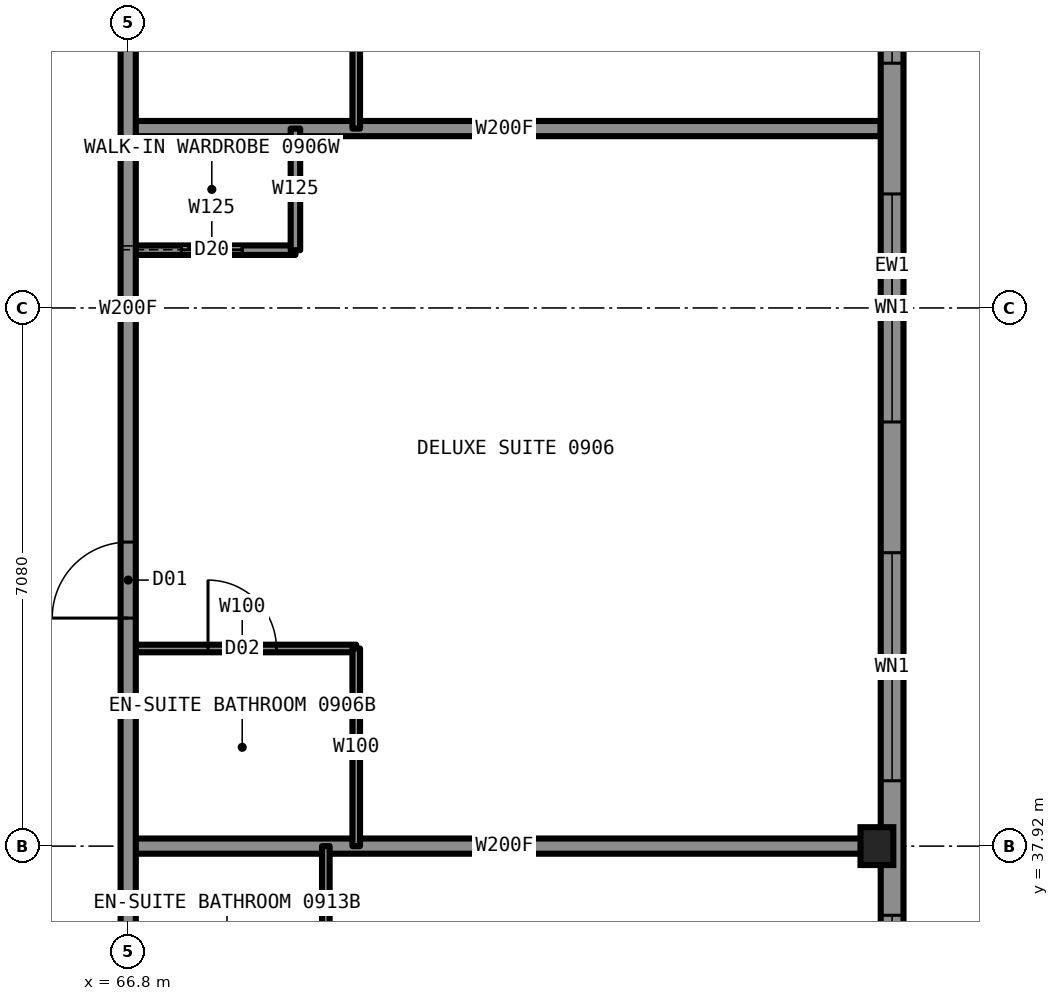
"""IFC4 building model, lengths in metres.
Left out: names, types, materials, properties, quantities, classifications, styles, units other than length and angle.
Written with IfcOpenShell. Run it as: python <this file> out.ifc"""

import sys

from ifc_helpers import new_model, si_unit, direction, frame, frame_2d, origin, origin_2d, place, context, subcontext, project, spatial, rectangle, i_section, extrude, element, fill, save


model = new_model("IFC4")
c1 = context("Model", 3, precision=1e-05, world=origin(), true_north=direction((0.0, 1.0)))
c2 = subcontext(c1, "Body", "Model", "MODEL_VIEW")
j1 = project(units=[si_unit("LENGTHUNIT", "METRE"), si_unit("PLANEANGLEUNIT", "RADIAN")], contexts=[c1])
p1 = place(None, origin())
s1 = spatial("IfcSite", under=j1, at=p1, CompositionType="ELEMENT")
p2 = place(p1, origin())
s2 = spatial("IfcBuilding", under=s1, at=p2, CompositionType="ELEMENT")
p3 = place(p2, frame((0.0, 0.0, 39.0)))
s3 = spatial("IfcBuildingStorey", under=s2, at=p3, CompositionType="ELEMENT", Elevation=39.0)
p4 = place(p3, frame((76.65, 37.92, 0.0), z_axis=(0.0, 0.0, 1.0), x_axis=(1.0, 0.0, 0.0)))
e1 = element("IfcColumn", 1, at=p4, inside=s3, PredefinedType="COLUMN", context=c2, shape_type="SweptSolid", body=[
    extrude(i_section(OverallWidth=0.432, OverallDepth=0.498, WebThickness=0.056, FlangeThickness=0.089, at=origin_2d()), origin(), (0.0, 0.0, 1.0), 3.5),
])
p5 = place(p3, frame((66.8, 40.52, 0.0), z_axis=(0.0, 0.0, 1.0), x_axis=(1.0, 0.0, 0.0)))
e2 = element("IfcWall", 2, at=p5, inside=s3, PredefinedType="PARTITIONING", context=c2, shape_type="SweptSolid", body=[
    extrude(rectangle(XDim=3.0, YDim=0.1, at=frame_2d((1.5, 0.0))), origin(), (0.0, 0.0, 1.0), 3.33),
])
p6 = place(p5, frame((1.05, 0.0, 0.0)))
e3 = element("IfcOpeningElement", 3, at=p6, cuts=e2, PredefinedType="OPENING", context=c2, shape_type="SweptSolid", body=[
    extrude(rectangle(XDim=0.9, YDim=2.1, at=frame_2d((0.45, 1.05))), frame((0.0, 0.06, 0.0), z_axis=(0.0, -1.0, 0.0), x_axis=(1.0, 0.0, 0.0)), (0.0, 0.0, 1.0), 0.12),
])
p7 = place(p3, frame((66.8, 37.92, 0.0), z_axis=(0.0, 0.0, 1.0), x_axis=(1.0, 0.0, 0.0)))
e4 = element("IfcWall", 4, at=p7, inside=s3, PredefinedType="PARTITIONING", context=c2, shape_type="SweptSolid", body=[
    extrude(rectangle(XDim=9.9, YDim=0.2, at=frame_2d((4.95, 0.0))), origin(), (0.0, 0.0, 1.0), 2.573),
])
p8 = place(p3, frame((66.8, 45.76, 0.0), z_axis=(0.0, 0.0, 1.0), x_axis=(1.0, 0.0, 0.0)))
e5 = element("IfcWall", 5, at=p8, inside=s3, PredefinedType="PARTITIONING", context=c2, shape_type="SweptSolid", body=[
    extrude(rectangle(XDim=2.2, YDim=0.125, at=frame_2d((1.1, 0.0))), origin(), (0.0, 0.0, 1.0), 3.33),
])
p9 = place(p8, frame((0.7, 0.0, 0.0)))
e6 = element("IfcOpeningElement", 6, at=p9, cuts=e5, PredefinedType="OPENING", context=c2, shape_type="SweptSolid", body=[
    extrude(rectangle(XDim=0.8, YDim=2.1, at=frame_2d((0.4, 1.05))), frame((0.0, 0.073, 0.0), z_axis=(0.0, -1.0, 0.0), x_axis=(1.0, 0.0, 0.0)), (0.0, 0.0, 1.0), 0.145),
])
p10 = place(p3, frame((66.8, 47.36, 0.0), z_axis=(0.0, 0.0, 1.0), x_axis=(1.0, 0.0, 0.0)))
e7 = element("IfcWall", 7, at=p10, inside=s3, PredefinedType="PARTITIONING", context=c2, shape_type="SweptSolid", body=[
    extrude(rectangle(XDim=9.9, YDim=0.2, at=frame_2d((4.95, 0.0))), origin(), (0.0, 0.0, 1.0), 2.723),
])
p11 = place(p3, frame((66.8, 33.2, 0.0), z_axis=(0.0, 0.0, 1.0), x_axis=(0.0, 1.0, 0.0)))
e8 = element("IfcWall", 8, at=p11, inside=s3, PredefinedType="PARTITIONING", context=c2, shape_type="SweptSolid", body=[
    extrude(rectangle(XDim=23.58, YDim=0.2, at=frame_2d((11.79, 0.0))), origin(), (0.0, 0.0, 1.0), 3.33),
])
p12 = place(p11, frame((7.72, 0.0, 0.0)))
e9 = element("IfcOpeningElement", 9, at=p12, cuts=e8, PredefinedType="OPENING", context=c2, shape_type="SweptSolid", body=[
    extrude(rectangle(XDim=1.0, YDim=2.2, at=frame_2d((0.5, 1.1))), frame((0.0, 0.11, 0.0), z_axis=(0.0, -1.0, 0.0), x_axis=(1.0, 0.0, 0.0)), (0.0, 0.0, 1.0), 0.22),
])
p13 = place(p11, frame((17.31, 0.0, 0.0)))
e10 = element("IfcOpeningElement", 10, at=p13, cuts=e8, PredefinedType="OPENING", context=c2, shape_type="SweptSolid", body=[
    extrude(rectangle(XDim=1.0, YDim=2.2, at=frame_2d((0.5, 1.1))), frame((0.0, 0.11, 0.0), z_axis=(0.0, -1.0, 0.0), x_axis=(1.0, 0.0, 0.0)), (0.0, 0.0, 1.0), 0.22),
])
p14 = place(p11, frame((21.84, 0.0, 0.0)))
e11 = element("IfcOpeningElement", 11, at=p14, cuts=e8, PredefinedType="OPENING", context=c2, shape_type="SweptSolid", body=[
    extrude(rectangle(XDim=1.1, YDim=2.2, at=frame_2d((0.55, 1.1))), frame((0.0, 0.11, 0.0), z_axis=(0.0, -1.0, 0.0), x_axis=(1.0, 0.0, 0.0)), (0.0, 0.0, 1.0), 0.22),
])
p15 = place(p11, frame((0.66, 0.0, 0.0)))
e12 = element("IfcOpeningElement", 12, at=p15, cuts=e8, PredefinedType="OPENING", context=c2, shape_type="SweptSolid", body=[
    extrude(rectangle(XDim=1.1, YDim=2.2, at=frame_2d((0.55, 1.1))), frame((0.0, 0.11, 0.0), z_axis=(0.0, -1.0, 0.0), x_axis=(1.0, 0.0, 0.0)), (0.0, 0.0, 1.0), 0.22),
])
p16 = place(p3, frame((69.0, 45.76, 0.0), z_axis=(0.0, 0.0, 1.0), x_axis=(0.0, 1.0, 0.0)))
e13 = element("IfcWall", 13, at=p16, inside=s3, PredefinedType="PARTITIONING", context=c2, shape_type="SweptSolid", body=[
    extrude(rectangle(XDim=1.6, YDim=0.125, at=frame_2d((0.8, 0.0))), origin(), (0.0, 0.0, 1.0), 3.33),
])
p17 = place(p3, frame((69.4, 35.32, 0.0), z_axis=(0.0, 0.0, 1.0), x_axis=(0.0, 1.0, 0.0)))
e14 = element("IfcWall", 14, at=p17, inside=s3, PredefinedType="PARTITIONING", context=c2, shape_type="SweptSolid", body=[
    extrude(rectangle(XDim=2.6, YDim=0.1, at=frame_2d((1.3, 0.0))), origin(), (0.0, 0.0, 1.0), 3.33),
])
p18 = place(p3, frame((69.8, 37.92, 0.0), z_axis=(0.0, 0.0, 1.0), x_axis=(0.0, 1.0, 0.0)))
e15 = element("IfcWall", 15, at=p18, inside=s3, PredefinedType="PARTITIONING", context=c2, shape_type="SweptSolid", body=[
    extrude(rectangle(XDim=2.6, YDim=0.1, at=frame_2d((1.3, 0.0))), origin(), (0.0, 0.0, 1.0), 3.33),
])
p19 = place(p3, frame((69.8, 47.36, 0.0), z_axis=(0.0, 0.0, 1.0), x_axis=(0.0, 1.0, 0.0)))
e16 = element("IfcWall", 16, at=p19, inside=s3, PredefinedType="PARTITIONING", context=c2, shape_type="SweptSolid", body=[
    extrude(rectangle(XDim=2.9, YDim=0.1, at=frame_2d((1.45, 0.0))), origin(), (0.0, 0.0, 1.0), 3.33),
])
p20 = place(p3, frame((76.85, 28.5, 0.0), z_axis=(0.0, 0.0, 1.0), x_axis=(0.0, 1.0, 0.0)))
e17 = element("IfcWall", 17, at=p20, inside=s3, PredefinedType="SOLIDWALL", context=c2, shape_type="SweptSolid", body=[
    extrude(rectangle(XDim=33.0, YDim=0.3, at=frame_2d((16.5, 0.0))), origin(), (0.0, 0.0, 1.0), 2.83),
])
p21 = place(p20, frame((0.85, 0.0, 0.5)))
e18 = element("IfcOpeningElement", 18, at=p21, cuts=e17, PredefinedType="OPENING", context=c2, shape_type="SweptSolid", body=[
    extrude(rectangle(XDim=2.5, YDim=2.0, at=frame_2d((1.25, 1.0))), frame((0.0, 0.16, 0.0), z_axis=(0.0, -1.0, 0.0), x_axis=(1.0, 0.0, 0.0)), (0.0, 0.0, 1.0), 0.32),
])
p22 = place(p20, frame((6.61, 0.0, 0.5)))
e19 = element("IfcOpeningElement", 19, at=p22, cuts=e17, PredefinedType="OPENING", context=c2, shape_type="SweptSolid", body=[
    extrude(rectangle(XDim=1.9, YDim=1.9, at=frame_2d((0.95, 0.95))), frame((0.0, 0.16, 0.0), z_axis=(0.0, -1.0, 0.0), x_axis=(1.0, 0.0, 0.0)), (0.0, 0.0, 1.0), 0.32),
])
p23 = place(p20, frame((10.28, 0.0, 0.5)))
e20 = element("IfcOpeningElement", 20, at=p23, cuts=e17, PredefinedType="OPENING", context=c2, shape_type="SweptSolid", body=[
    extrude(rectangle(XDim=3.0, YDim=2.0, at=frame_2d((1.5, 1.0))), frame((0.0, 0.16, 0.0), z_axis=(0.0, -1.0, 0.0), x_axis=(1.0, 0.0, 0.0)), (0.0, 0.0, 1.0), 0.32),
])
p24 = place(p20, frame((15.0, 0.0, 0.5)))
e21 = element("IfcOpeningElement", 21, at=p24, cuts=e17, PredefinedType="OPENING", context=c2, shape_type="SweptSolid", body=[
    extrude(rectangle(XDim=3.0, YDim=2.0, at=frame_2d((1.5, 1.0))), frame((0.0, 0.16, 0.0), z_axis=(0.0, -1.0, 0.0), x_axis=(1.0, 0.0, 0.0)), (0.0, 0.0, 1.0), 0.32),
])
p25 = place(p20, frame((19.72, 0.0, 0.5)))
e22 = element("IfcOpeningElement", 22, at=p25, cuts=e17, PredefinedType="OPENING", context=c2, shape_type="SweptSolid", body=[
    extrude(rectangle(XDim=3.0, YDim=2.0, at=frame_2d((1.5, 1.0))), frame((0.0, 0.16, 0.0), z_axis=(0.0, -1.0, 0.0), x_axis=(1.0, 0.0, 0.0)), (0.0, 0.0, 1.0), 0.32),
])
p26 = place(p20, frame((24.44, 0.0, 0.5)))
e23 = element("IfcOpeningElement", 23, at=p26, cuts=e17, PredefinedType="OPENING", context=c2, shape_type="SweptSolid", body=[
    extrude(rectangle(XDim=1.9, YDim=1.9, at=frame_2d((0.95, 0.95))), frame((0.0, 0.16, 0.0), z_axis=(0.0, -1.0, 0.0), x_axis=(1.0, 0.0, 0.0)), (0.0, 0.0, 1.0), 0.32),
])
p27 = place(p20, frame((29.6, 0.0, 0.5)))
e24 = element("IfcOpeningElement", 24, at=p27, cuts=e17, PredefinedType="OPENING", context=c2, shape_type="SweptSolid", body=[
    extrude(rectangle(XDim=2.5, YDim=2.0, at=frame_2d((1.25, 1.0))), frame((0.0, 0.16, 0.0), z_axis=(0.0, -1.0, 0.0), x_axis=(1.0, 0.0, 0.0)), (0.0, 0.0, 1.0), 0.32),
])
p28 = place(p20, frame((5.91, 0.0, 0.5)))
e25 = element("IfcOpeningElement", 25, at=p28, cuts=e17, PredefinedType="OPENING", context=c2, shape_type="SweptSolid", body=[
    extrude(rectangle(XDim=0.7, YDim=1.0, at=frame_2d((0.35, 0.5))), frame((0.0, 0.16, 0.0), z_axis=(0.0, -1.0, 0.0), x_axis=(1.0, 0.0, 0.0)), (0.0, 0.0, 1.0), 0.32),
])
p29 = place(p20, frame((26.39, 0.0, 0.5)))
e26 = element("IfcOpeningElement", 26, at=p29, cuts=e17, PredefinedType="OPENING", context=c2, shape_type="SweptSolid", body=[
    extrude(rectangle(XDim=0.7, YDim=1.0, at=frame_2d((0.35, 0.5))), frame((0.0, 0.16, 0.0), z_axis=(0.0, -1.0, 0.0), x_axis=(1.0, 0.0, 0.0)), (0.0, 0.0, 1.0), 0.32),
])
p30 = place(p12, origin())
e27 = element("IfcDoor", 27, at=p30, inside=s3, OperationType="SINGLE_SWING_LEFT", PredefinedType="DOOR", context=c2, shape_type="SweptSolid", body=[
    extrude(rectangle(XDim=1.0, YDim=2.2, at=frame_2d((0.5, 1.1))), frame((0.0, 0.025, 0.0), z_axis=(0.0, -1.0, 0.0), x_axis=(1.0, 0.0, 0.0)), (0.0, 0.0, 1.0), 0.05),
])
fill(e9, e27)
p31 = place(p6, origin())
e28 = element("IfcDoor", 28, at=p31, inside=s3, OperationType="SINGLE_SWING_RIGHT", PredefinedType="DOOR", context=c2, shape_type="SweptSolid", body=[
    extrude(rectangle(XDim=0.9, YDim=2.1, at=frame_2d((0.45, 1.05))), frame((0.0, 0.025, 0.0), z_axis=(0.0, -1.0, 0.0), x_axis=(1.0, 0.0, 0.0)), (0.0, 0.0, 1.0), 0.05),
])
fill(e3, e28)
p32 = place(p9, origin())
e29 = element("IfcDoor", 29, at=p32, inside=s3, OperationType="SLIDING_TO_LEFT", PredefinedType="DOOR", context=c2, shape_type="SweptSolid", body=[
    extrude(rectangle(XDim=0.8, YDim=2.1, at=frame_2d((0.4, 1.05))), frame((0.0, 0.025, 0.0), z_axis=(0.0, -1.0, 0.0), x_axis=(1.0, 0.0, 0.0)), (0.0, 0.0, 1.0), 0.05),
])
fill(e6, e29)
p33 = place(p22, origin())
e30 = element("IfcWindow", 30, at=p33, inside=s3, PartitioningType="SINGLE_PANEL", PredefinedType="WINDOW", context=c2, shape_type="SweptSolid", body=[
    extrude(rectangle(XDim=1.9, YDim=1.9, at=frame_2d((0.95, 0.95))), frame((0.0, 0.03, 0.0), z_axis=(0.0, -1.0, 0.0), x_axis=(1.0, 0.0, 0.0)), (0.0, 0.0, 1.0), 0.06),
])
fill(e19, e30)
p34 = place(p23, origin())
e31 = element("IfcWindow", 31, at=p34, inside=s3, PartitioningType="SINGLE_PANEL", PredefinedType="WINDOW", context=c2, shape_type="SweptSolid", body=[
    extrude(rectangle(XDim=3.0, YDim=2.0, at=frame_2d((1.5, 1.0))), frame((0.0, 0.03, 0.0), z_axis=(0.0, -1.0, 0.0), x_axis=(1.0, 0.0, 0.0)), (0.0, 0.0, 1.0), 0.06),
])
fill(e20, e31)
p35 = place(p24, origin())
e32 = element("IfcWindow", 32, at=p35, inside=s3, PartitioningType="SINGLE_PANEL", PredefinedType="WINDOW", context=c2, shape_type="SweptSolid", body=[
    extrude(rectangle(XDim=3.0, YDim=2.0, at=frame_2d((1.5, 1.0))), frame((0.0, 0.03, 0.0), z_axis=(0.0, -1.0, 0.0), x_axis=(1.0, 0.0, 0.0)), (0.0, 0.0, 1.0), 0.06),
])
fill(e21, e32)
p36 = place(p25, origin())
e33 = element("IfcWindow", 33, at=p36, inside=s3, PartitioningType="SINGLE_PANEL", PredefinedType="WINDOW", context=c2, shape_type="SweptSolid", body=[
    extrude(rectangle(XDim=3.0, YDim=2.0, at=frame_2d((1.5, 1.0))), frame((0.0, 0.03, 0.0), z_axis=(0.0, -1.0, 0.0), x_axis=(1.0, 0.0, 0.0)), (0.0, 0.0, 1.0), 0.06),
])
fill(e22, e33)
save(model, sys.argv[1])
